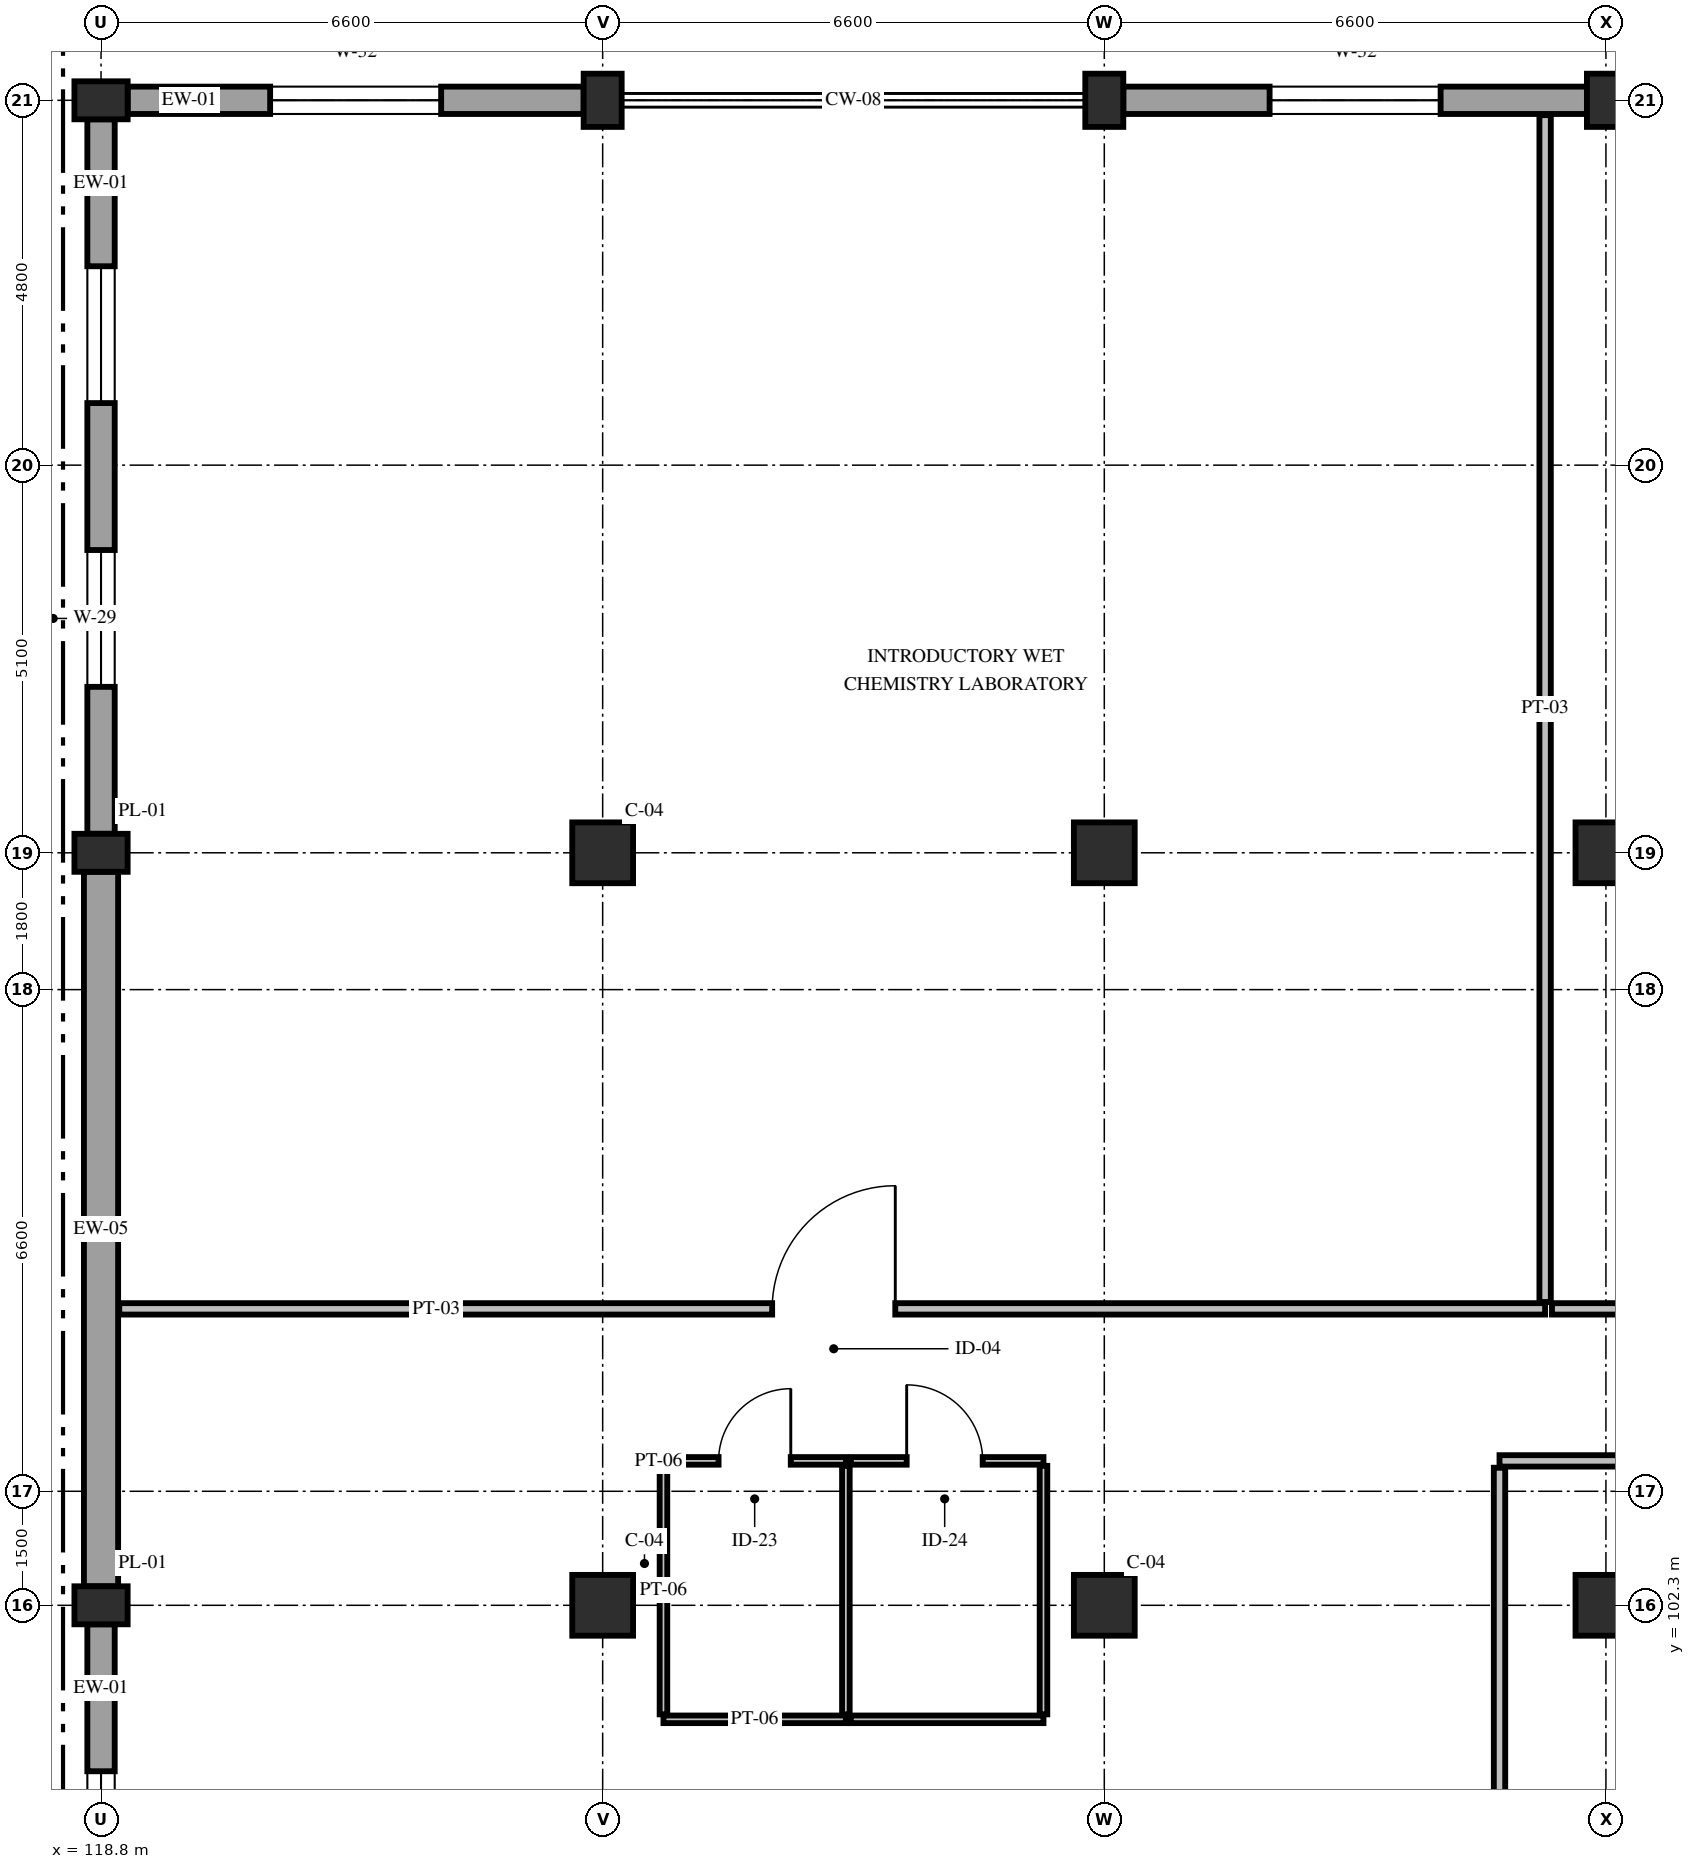
"""IFC4 building model, lengths in metres.
Left out: names, types, materials, properties, quantities, classifications, styles, units other than length and angle.
Written with IfcOpenShell. Run it as: python <this file> out.ifc"""

import sys

from ifc_helpers import new_model, si_unit, direction, frame, frame_2d, origin, origin_2d, place, context, subcontext, project, spatial, rectangle, extrude, element, fill, save


model = new_model("IFC4")
c1 = context("Model", 3, precision=1e-05, world=origin(), true_north=direction((0.0, 1.0)))
c2 = subcontext(c1, "Body", "Model", "MODEL_VIEW")
j1 = project(units=[si_unit("LENGTHUNIT", "METRE"), si_unit("PLANEANGLEUNIT", "RADIAN")], contexts=[c1])
p1 = place(None, origin())
s1 = spatial("IfcSite", under=j1, at=p1, CompositionType="ELEMENT")
p2 = place(p1, origin())
s2 = spatial("IfcBuilding", under=s1, at=p2, CompositionType="ELEMENT")
p3 = place(p2, origin())
s3 = spatial("IfcBuildingStorey", under=s2, at=p3, CompositionType="ELEMENT", Elevation=0.0)
for number, where, z_axis, x_axis in (
    (1, (118.8, 102.3, 0.0), (0.0, 0.0, 1.0), (0.0, 1.0, 0.0)),
    (2, (118.8, 112.2, 0.0), (0.0, 0.0, 1.0), (0.0, 1.0, 0.0)),
    (3, (118.8, 122.1, 0.0), (0.0, 0.0, 1.0), (0.0, 1.0, 0.0)),
):
    element("IfcColumn", number, at=place(p3, frame(where, z_axis=z_axis, x_axis=x_axis)), inside=s3, PredefinedType="PILASTER", context=c2, shape_type="SweptSolid", body=[
        extrude(rectangle(XDim=0.5, YDim=0.7, at=origin_2d()), origin(), (0.0, 0.0, 1.0), 5.4),
    ])
for number, where, z_axis, x_axis in (
    (4, (125.4, 102.3, 0.0), (0.0, 0.0, 1.0), (1.0, 0.0, 0.0)),
    (5, (125.4, 112.2, 0.0), (0.0, 0.0, 1.0), (1.0, 0.0, 0.0)),
):
    element("IfcColumn", number, at=place(p3, frame(where, z_axis=z_axis, x_axis=x_axis)), inside=s3, PredefinedType="COLUMN", context=c2, shape_type="SweptSolid", body=[
        extrude(rectangle(XDim=0.8, YDim=0.8, at=origin_2d()), origin(), (0.0, 0.0, 1.0), 5.4),
    ])
p4 = place(p3, frame((125.4, 122.1, 0.0), z_axis=(0.0, 0.0, 1.0), x_axis=(1.0, 0.0, 0.0)))
e6 = element("IfcColumn", 6, at=p4, inside=s3, PredefinedType="PILASTER", context=c2, shape_type="SweptSolid", body=[
    extrude(rectangle(XDim=0.5, YDim=0.7, at=origin_2d()), origin(), (0.0, 0.0, 1.0), 5.4),
])
for number, where, z_axis, x_axis in (
    (7, (132.0, 102.3, 0.0), (0.0, 0.0, 1.0), (1.0, 0.0, 0.0)),
    (8, (132.0, 112.2, 0.0), (0.0, 0.0, 1.0), (1.0, 0.0, 0.0)),
):
    element("IfcColumn", number, at=place(p3, frame(where, z_axis=z_axis, x_axis=x_axis)), inside=s3, PredefinedType="COLUMN", context=c2, shape_type="SweptSolid", body=[
        extrude(rectangle(XDim=0.8, YDim=0.8, at=origin_2d()), origin(), (0.0, 0.0, 1.0), 5.4),
    ])
p5 = place(p3, frame((132.0, 122.1, 0.0), z_axis=(0.0, 0.0, 1.0), x_axis=(1.0, 0.0, 0.0)))
e9 = element("IfcColumn", 9, at=p5, inside=s3, PredefinedType="PILASTER", context=c2, shape_type="SweptSolid", body=[
    extrude(rectangle(XDim=0.5, YDim=0.7, at=origin_2d()), origin(), (0.0, 0.0, 1.0), 5.4),
])
for number, where, z_axis, x_axis in (
    (10, (138.6, 102.3, 0.0), (0.0, 0.0, 1.0), (1.0, 0.0, 0.0)),
    (11, (138.6, 112.2, 0.0), (0.0, 0.0, 1.0), (1.0, 0.0, 0.0)),
):
    element("IfcColumn", number, at=place(p3, frame(where, z_axis=z_axis, x_axis=x_axis)), inside=s3, PredefinedType="COLUMN", context=c2, shape_type="SweptSolid", body=[
        extrude(rectangle(XDim=0.8, YDim=0.8, at=origin_2d()), origin(), (0.0, 0.0, 1.0), 5.4),
    ])
p6 = place(p3, frame((138.6, 122.1, 0.0), z_axis=(0.0, 0.0, 1.0), x_axis=(1.0, 0.0, 0.0)))
e12 = element("IfcColumn", 12, at=p6, inside=s3, PredefinedType="PILASTER", context=c2, shape_type="SweptSolid", body=[
    extrude(rectangle(XDim=0.5, YDim=0.7, at=origin_2d()), origin(), (0.0, 0.0, 1.0), 5.4),
])
p7 = place(p3, frame((118.8, 92.65, 0.0), z_axis=(0.0, 0.0, 1.0), x_axis=(0.0, 1.0, 0.0)))
e13 = element("IfcWall", 13, at=p7, inside=s3, PredefinedType="STANDARD", context=c2, shape_type="SweptSolid", body=[
    extrude(rectangle(XDim=9.4, YDim=0.36, at=frame_2d((4.7, 0.0))), origin(), (0.0, 0.0, 1.0), 4.55),
])
p8 = place(p7, frame((1.933, 0.0, 0.85)))
e14 = element("IfcOpeningElement", 14, at=p8, cuts=e13, PredefinedType="OPENING", context=c2, shape_type="SweptSolid", body=[
    extrude(rectangle(XDim=1.8, YDim=2.04, at=frame_2d((0.9, 1.02))), frame((0.0, 0.195, 0.0), z_axis=(0.0, -1.0, 0.0), x_axis=(1.0, 0.0, 0.0)), (0.0, 0.0, 1.0), 0.39),
])
p9 = place(p7, frame((5.667, 0.0, 0.85)))
e15 = element("IfcOpeningElement", 15, at=p9, cuts=e13, PredefinedType="OPENING", context=c2, shape_type="SweptSolid", body=[
    extrude(rectangle(XDim=1.8, YDim=2.04, at=frame_2d((0.9, 1.02))), frame((0.0, 0.195, 0.0), z_axis=(0.0, -1.0, 0.0), x_axis=(1.0, 0.0, 0.0)), (0.0, 0.0, 1.0), 0.39),
])
p10 = place(p3, frame((118.8, 102.55, 0.0), z_axis=(0.0, 0.0, 1.0), x_axis=(0.0, 1.0, 0.0)))
e16 = element("IfcWall", 16, at=p10, inside=s3, PredefinedType="SOLIDWALL", context=c2, shape_type="SweptSolid", body=[
    extrude(rectangle(XDim=9.4, YDim=0.45, at=frame_2d((4.7, 0.0))), origin(), (0.0, 0.0, 1.0), 4.55),
])
p11 = place(p3, frame((118.8, 112.45, 0.0), z_axis=(0.0, 0.0, 1.0), x_axis=(0.0, 1.0, 0.0)))
e17 = element("IfcWall", 17, at=p11, inside=s3, PredefinedType="STANDARD", context=c2, shape_type="SweptSolid", body=[
    extrude(rectangle(XDim=9.4, YDim=0.36, at=frame_2d((4.7, 0.0))), origin(), (0.0, 0.0, 1.0), 3.96),
])
p12 = place(p11, frame((1.933, 0.0, 0.85)))
e18 = element("IfcOpeningElement", 18, at=p12, cuts=e17, PredefinedType="OPENING", context=c2, shape_type="SweptSolid", body=[
    extrude(rectangle(XDim=1.8, YDim=2.04, at=frame_2d((0.9, 1.02))), frame((0.0, 0.195, 0.0), z_axis=(0.0, -1.0, 0.0), x_axis=(1.0, 0.0, 0.0)), (0.0, 0.0, 1.0), 0.39),
])
p13 = place(p11, frame((5.667, 0.0, 0.85)))
e19 = element("IfcOpeningElement", 19, at=p13, cuts=e17, PredefinedType="OPENING", context=c2, shape_type="SweptSolid", body=[
    extrude(rectangle(XDim=1.8, YDim=2.04, at=frame_2d((0.9, 1.02))), frame((0.0, 0.195, 0.0), z_axis=(0.0, -1.0, 0.0), x_axis=(1.0, 0.0, 0.0)), (0.0, 0.0, 1.0), 0.39),
])
p14 = place(p3, frame((119.15, 122.1, 0.0), z_axis=(0.0, 0.0, 1.0), x_axis=(1.0, 0.0, 0.0)))
e20 = element("IfcWall", 20, at=p14, inside=s3, PredefinedType="STANDARD", context=c2, shape_type="SweptSolid", body=[
    extrude(rectangle(XDim=6.0, YDim=0.36, at=frame_2d((3.0, 0.0))), origin(), (0.0, 0.0, 1.0), 4.38),
])
p15 = place(p14, frame((1.875, 0.0, 0.85)))
e21 = element("IfcOpeningElement", 21, at=p15, cuts=e20, PredefinedType="OPENING", context=c2, shape_type="SweptSolid", body=[
    extrude(rectangle(XDim=2.25, YDim=1.88, at=frame_2d((1.125, 0.94))), frame((0.0, 0.195, 0.0), z_axis=(0.0, -1.0, 0.0), x_axis=(1.0, 0.0, 0.0)), (0.0, 0.0, 1.0), 0.39),
])
p16 = place(p3, frame((132.25, 122.1, 0.0), z_axis=(0.0, 0.0, 1.0), x_axis=(1.0, 0.0, 0.0)))
e22 = element("IfcWall", 22, at=p16, inside=s3, PredefinedType="STANDARD", context=c2, shape_type="SweptSolid", body=[
    extrude(rectangle(XDim=6.1, YDim=0.36, at=frame_2d((3.05, 0.0))), origin(), (0.0, 0.0, 1.0), 4.38),
])
p17 = place(p16, frame((1.925, 0.0, 0.85)))
e23 = element("IfcOpeningElement", 23, at=p17, cuts=e22, PredefinedType="OPENING", context=c2, shape_type="SweptSolid", body=[
    extrude(rectangle(XDim=2.25, YDim=1.88, at=frame_2d((1.125, 0.94))), frame((0.0, 0.195, 0.0), z_axis=(0.0, -1.0, 0.0), x_axis=(1.0, 0.0, 0.0)), (0.0, 0.0, 1.0), 0.39),
])
p18 = place(p3, frame((126.2, 100.8, 0.0), z_axis=(0.0, 0.0, 1.0), x_axis=(1.0, 0.0, 0.0)))
e24 = element("IfcWall", 24, at=p18, inside=s3, PredefinedType="PARTITIONING", context=c2, shape_type="SweptSolid", body=[
    extrude(rectangle(XDim=2.4, YDim=0.1, at=frame_2d((1.2, 0.0))), origin(), (0.0, 0.0, 1.0), 5.04),
])
p19 = place(p3, frame((126.2, 104.2, 0.0), z_axis=(0.0, 0.0, 1.0), x_axis=(1.0, 0.0, 0.0)))
e25 = element("IfcWall", 25, at=p19, inside=s3, PredefinedType="PARTITIONING", context=c2, shape_type="SweptSolid", body=[
    extrude(rectangle(XDim=2.4, YDim=0.1, at=frame_2d((1.2, 0.0))), origin(), (0.0, 0.0, 1.0), 4.845),
])
p20 = place(p19, frame((0.725, 0.0, 0.0)))
e26 = element("IfcOpeningElement", 26, at=p20, cuts=e25, PredefinedType="OPENING", context=c2, shape_type="SweptSolid", body=[
    extrude(rectangle(XDim=0.95, YDim=2.15, at=frame_2d((0.475, 1.075))), frame((0.0, 0.065, 0.0), z_axis=(0.0, -1.0, 0.0), x_axis=(1.0, 0.0, 0.0)), (0.0, 0.0, 1.0), 0.13),
])
for number, where, z_axis, x_axis in (
    (27, (126.2, 100.865, 0.0), (0.0, 0.0, 1.0), (0.0, 1.0, 0.0)),
    (28, (128.6, 100.865, 0.0), (0.0, 0.0, 1.0), (0.0, 1.0, 0.0)),
):
    element("IfcWall", number, at=place(p3, frame(where, z_axis=z_axis, x_axis=x_axis)), inside=s3, PredefinedType="PARTITIONING", context=c2, shape_type="SweptSolid", body=[
        extrude(rectangle(XDim=3.27, YDim=0.1, at=frame_2d((1.635, 0.0))), origin(), (0.0, 0.0, 1.0), 4.665),
    ])
p21 = place(p3, frame((128.665, 100.8, 0.0), z_axis=(0.0, 0.0, 1.0), x_axis=(1.0, 0.0, 0.0)))
e29 = element("IfcWall", 29, at=p21, inside=s3, PredefinedType="PARTITIONING", context=c2, shape_type="SweptSolid", body=[
    extrude(rectangle(XDim=2.535, YDim=0.1, at=frame_2d((1.268, 0.0))), origin(), (0.0, 0.0, 1.0), 5.04),
])
p22 = place(p3, frame((128.665, 104.2, 0.0), z_axis=(0.0, 0.0, 1.0), x_axis=(1.0, 0.0, 0.0)))
e30 = element("IfcWall", 30, at=p22, inside=s3, PredefinedType="PARTITIONING", context=c2, shape_type="SweptSolid", body=[
    extrude(rectangle(XDim=2.535, YDim=0.1, at=frame_2d((1.268, 0.0))), origin(), (0.0, 0.0, 1.0), 4.845),
])
p23 = place(p22, frame((0.735, 0.0, 0.0)))
e31 = element("IfcOpeningElement", 31, at=p23, cuts=e30, PredefinedType="OPENING", context=c2, shape_type="SweptSolid", body=[
    extrude(rectangle(XDim=1.0, YDim=2.15, at=frame_2d((0.5, 1.075))), frame((0.0, 0.065, 0.0), z_axis=(0.0, -1.0, 0.0), x_axis=(1.0, 0.0, 0.0)), (0.0, 0.0, 1.0), 0.13),
])
p24 = place(p3, frame((131.2, 100.865, 0.0), z_axis=(0.0, 0.0, 1.0), x_axis=(0.0, 1.0, 0.0)))
e32 = element("IfcWall", 32, at=p24, inside=s3, PredefinedType="PARTITIONING", context=c2, shape_type="SweptSolid", body=[
    extrude(rectangle(XDim=3.27, YDim=0.1, at=frame_2d((1.635, 0.0))), origin(), (0.0, 0.0, 1.0), 4.665),
])
p25 = place(p3, frame((119.04, 106.2, 0.0), z_axis=(0.0, 0.0, 1.0), x_axis=(1.0, 0.0, 0.0)))
e33 = element("IfcWall", 33, at=p25, inside=s3, PredefinedType="PARTITIONING", context=c2, shape_type="SweptSolid", body=[
    extrude(rectangle(XDim=18.76, YDim=0.15, at=frame_2d((9.38, 0.0))), origin(), (0.0, 0.0, 1.0), 4.38),
])
p26 = place(p25, frame((8.59, 0.0, 0.0)))
e34 = element("IfcOpeningElement", 34, at=p26, cuts=e33, PredefinedType="OPENING", context=c2, shape_type="SweptSolid", body=[
    extrude(rectangle(XDim=1.62, YDim=2.3, at=frame_2d((0.81, 1.15))), frame((0.0, 0.09, 0.0), z_axis=(0.0, -1.0, 0.0), x_axis=(1.0, 0.0, 0.0)), (0.0, 0.0, 1.0), 0.18),
])
p27 = place(p3, frame((137.8, 106.29, 0.0), z_axis=(0.0, 0.0, 1.0), x_axis=(0.0, 1.0, 0.0)))
e35 = element("IfcWall", 35, at=p27, inside=s3, PredefinedType="PARTITIONING", context=c2, shape_type="SweptSolid", body=[
    extrude(rectangle(XDim=15.615, YDim=0.15, at=frame_2d((7.808, 0.0))), origin(), (0.0, 0.0, 1.0), 4.53),
])
p28 = place(p3, frame((137.89, 106.2, 0.0), z_axis=(0.0, 0.0, 1.0), x_axis=(1.0, 0.0, 0.0)))
e36 = element("IfcWall", 36, at=p28, inside=s3, PredefinedType="PARTITIONING", context=c2, shape_type="SweptSolid", body=[
    extrude(rectangle(XDim=25.71, YDim=0.15, at=frame_2d((12.855, 0.0))), origin(), (0.0, 0.0, 1.0), 4.38),
])
p29 = place(p28, frame((14.79, 0.0, 0.0)))
e37 = element("IfcOpeningElement", 37, at=p29, cuts=e36, PredefinedType="OPENING", context=c2, shape_type="SweptSolid", body=[
    extrude(rectangle(XDim=1.34, YDim=2.2, at=frame_2d((0.67, 1.1))), frame((0.0, 0.09, 0.0), z_axis=(0.0, -1.0, 0.0), x_axis=(1.0, 0.0, 0.0)), (0.0, 0.0, 1.0), 0.18),
])
p30 = place(p3, frame((137.2, 104.2, 0.0), z_axis=(0.0, 0.0, 1.0), x_axis=(1.0, 0.0, 0.0)))
e38 = element("IfcWall", 38, at=p30, inside=s3, PredefinedType="PARTITIONING", context=c2, shape_type="SweptSolid", body=[
    extrude(rectangle(XDim=11.2, YDim=0.15, at=frame_2d((5.6, 0.0))), origin(), (0.0, 0.0, 1.0), 4.38),
])
p31 = place(p30, frame((4.79, 0.0, 0.0)))
e39 = element("IfcOpeningElement", 39, at=p31, cuts=e38, PredefinedType="OPENING", context=c2, shape_type="SweptSolid", body=[
    extrude(rectangle(XDim=1.62, YDim=2.3, at=frame_2d((0.81, 1.15))), frame((0.0, 0.09, 0.0), z_axis=(0.0, -1.0, 0.0), x_axis=(1.0, 0.0, 0.0)), (0.0, 0.0, 1.0), 0.18),
])
p32 = place(p3, frame((137.2, 92.44, 0.0), z_axis=(0.0, 0.0, 1.0), x_axis=(0.0, 1.0, 0.0)))
e40 = element("IfcWall", 40, at=p32, inside=s3, PredefinedType="PARTITIONING", context=c2, shape_type="SweptSolid", body=[
    extrude(rectangle(XDim=11.67, YDim=0.15, at=frame_2d((5.835, 0.0))), origin(), (0.0, 0.0, 1.0), 4.53),
])
p33 = place(p9, origin())
e41 = element("IfcWindow", 41, at=p33, inside=s3, PartitioningType="DOUBLE_PANEL_VERTICAL", PredefinedType="WINDOW", context=c2, shape_type="SweptSolid", body=[
    extrude(rectangle(XDim=1.8, YDim=2.04, at=frame_2d((0.9, 1.02))), frame((0.0, 0.03, 0.0), z_axis=(0.0, -1.0, 0.0), x_axis=(1.0, 0.0, 0.0)), (0.0, 0.0, 1.0), 0.06),
])
fill(e15, e41)
p34 = place(p12, origin())
e42 = element("IfcWindow", 42, at=p34, inside=s3, PartitioningType="DOUBLE_PANEL_VERTICAL", PredefinedType="WINDOW", context=c2, shape_type="SweptSolid", body=[
    extrude(rectangle(XDim=1.8, YDim=2.04, at=frame_2d((0.9, 1.02))), frame((0.0, 0.03, 0.0), z_axis=(0.0, -1.0, 0.0), x_axis=(1.0, 0.0, 0.0)), (0.0, 0.0, 1.0), 0.06),
])
fill(e18, e42)
p35 = place(p13, origin())
e43 = element("IfcWindow", 43, at=p35, inside=s3, PartitioningType="DOUBLE_PANEL_VERTICAL", PredefinedType="WINDOW", context=c2, shape_type="SweptSolid", body=[
    extrude(rectangle(XDim=1.8, YDim=2.04, at=frame_2d((0.9, 1.02))), frame((0.0, 0.03, 0.0), z_axis=(0.0, -1.0, 0.0), x_axis=(1.0, 0.0, 0.0)), (0.0, 0.0, 1.0), 0.06),
])
fill(e19, e43)
p36 = place(p15, origin())
e44 = element("IfcWindow", 44, at=p36, inside=s3, PartitioningType="DOUBLE_PANEL_VERTICAL", PredefinedType="WINDOW", context=c2, shape_type="SweptSolid", body=[
    extrude(rectangle(XDim=2.25, YDim=1.88, at=frame_2d((1.125, 0.94))), frame((0.0, 0.03, 0.0), z_axis=(0.0, -1.0, 0.0), x_axis=(1.0, 0.0, 0.0)), (0.0, 0.0, 1.0), 0.06),
])
fill(e21, e44)
p37 = place(p17, origin())
e45 = element("IfcWindow", 45, at=p37, inside=s3, PartitioningType="DOUBLE_PANEL_VERTICAL", PredefinedType="WINDOW", context=c2, shape_type="SweptSolid", body=[
    extrude(rectangle(XDim=2.25, YDim=1.88, at=frame_2d((1.125, 0.94))), frame((0.0, 0.03, 0.0), z_axis=(0.0, -1.0, 0.0), x_axis=(1.0, 0.0, 0.0)), (0.0, 0.0, 1.0), 0.06),
])
fill(e23, e45)
p38 = place(p20, origin())
e46 = element("IfcDoor", 46, at=p38, inside=s3, OperationType="SINGLE_SWING_RIGHT", PredefinedType="DOOR", context=c2, shape_type="SweptSolid", body=[
    extrude(rectangle(XDim=0.95, YDim=2.15, at=frame_2d((0.475, 1.075))), frame((0.0, 0.025, 0.0), z_axis=(0.0, -1.0, 0.0), x_axis=(1.0, 0.0, 0.0)), (0.0, 0.0, 1.0), 0.05),
])
fill(e26, e46)
p39 = place(p23, origin())
e47 = element("IfcDoor", 47, at=p39, inside=s3, OperationType="SINGLE_SWING_LEFT", PredefinedType="DOOR", context=c2, shape_type="SweptSolid", body=[
    extrude(rectangle(XDim=1.0, YDim=2.15, at=frame_2d((0.5, 1.075))), frame((0.0, 0.025, 0.0), z_axis=(0.0, -1.0, 0.0), x_axis=(1.0, 0.0, 0.0)), (0.0, 0.0, 1.0), 0.05),
])
fill(e31, e47)
p40 = place(p26, origin())
e48 = element("IfcDoor", 48, at=p40, inside=s3, OperationType="SINGLE_SWING_RIGHT", PredefinedType="DOOR", context=c2, shape_type="SweptSolid", body=[
    extrude(rectangle(XDim=1.62, YDim=2.3, at=frame_2d((0.81, 1.15))), frame((0.0, 0.025, 0.0), z_axis=(0.0, -1.0, 0.0), x_axis=(1.0, 0.0, 0.0)), (0.0, 0.0, 1.0), 0.05),
])
fill(e34, e48)
save(model, sys.argv[1])
